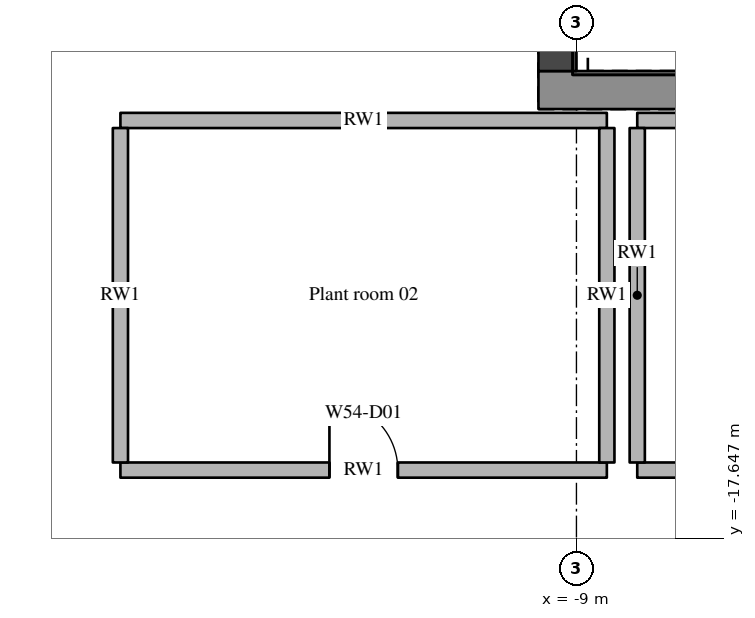
"""IFC4 building model, lengths in metres.
Left out: names, types, materials, properties, quantities, classifications, styles, units other than length and angle.
Written with IfcOpenShell. Run it as: python <this file> out.ifc"""

import sys

from ifc_helpers import new_model, si_unit, direction, frame, frame_2d, origin, place, context, subcontext, project, spatial, rectangle, extrude, element, fill, save


model = new_model("IFC4")
c1 = context("Model", 3, precision=1e-05, world=origin(), true_north=direction((0.0, 1.0)))
c2 = subcontext(c1, "Body", "Model", "MODEL_VIEW")
j1 = project(units=[si_unit("LENGTHUNIT", "METRE"), si_unit("PLANEANGLEUNIT", "RADIAN")], contexts=[c1])
p1 = place(None, origin())
s1 = spatial("IfcSite", under=j1, at=p1, CompositionType="ELEMENT")
p2 = place(p1, origin())
s2 = spatial("IfcBuilding", under=s1, at=p2, CompositionType="ELEMENT")
p3 = place(p2, frame((0.0, 0.0, 210.0)))
s3 = spatial("IfcBuildingStorey", under=s2, at=p3, CompositionType="ELEMENT", Elevation=210.0)
p4 = place(p3, frame((-9.5, -11.75, 0.0), z_axis=(0.0, 0.0, 1.0), x_axis=(1.0, 0.0, 0.0)))
e1 = element("IfcWall", 1, at=p4, inside=s3, PredefinedType="SHEAR", context=c2, shape_type="SweptSolid", body=[
    extrude(rectangle(XDim=19.0, YDim=0.5, at=frame_2d((9.5, 0.0))), origin(), (0.0, 0.0, 1.0), 7.2),
])
p5 = place(p3, frame((-9.25, -11.5, 0.0), z_axis=(0.0, 0.0, 1.0), x_axis=(0.0, 1.0, 0.0)))
e2 = element("IfcWall", 2, at=p5, inside=s3, PredefinedType="SHEAR", context=c2, shape_type="SweptSolid", body=[
    extrude(rectangle(XDim=11.65, YDim=0.5, at=frame_2d((5.825, 0.0))), origin(), (0.0, 0.0, 1.0), 7.2),
])
p6 = place(p3, frame((-15.0, -16.75, 0.0), z_axis=(0.0, 0.0, 1.0), x_axis=(1.0, 0.0, 0.0)))
e3 = element("IfcWall", 3, at=p6, inside=s3, PredefinedType="SOLIDWALL", context=c2, shape_type="SweptSolid", body=[
    extrude(rectangle(XDim=6.4, YDim=0.2, at=frame_2d((3.2, 0.0))), origin(), (0.0, 0.0, 1.0), 5.5),
])
p7 = place(p6, frame((2.75, 0.0, 0.0)))
e4 = element("IfcOpeningElement", 4, at=p7, cuts=e3, PredefinedType="OPENING", context=c2, shape_type="SweptSolid", body=[
    extrude(rectangle(XDim=0.9, YDim=2.1, at=frame_2d((0.45, 1.05))), frame((0.0, 0.11, 0.0), z_axis=(0.0, -1.0, 0.0), x_axis=(1.0, 0.0, 0.0)), (0.0, 0.0, 1.0), 0.22),
])
p8 = place(p3, frame((-8.2, -16.75, 0.0), z_axis=(0.0, 0.0, 1.0), x_axis=(1.0, 0.0, 0.0)))
e5 = element("IfcWall", 5, at=p8, inside=s3, PredefinedType="SOLIDWALL", context=c2, shape_type="SweptSolid", body=[
    extrude(rectangle(XDim=6.4, YDim=0.2, at=frame_2d((3.2, 0.0))), origin(), (0.0, 0.0, 1.0), 5.5),
])
p9 = place(p8, frame((2.75, 0.0, 0.0)))
e6 = element("IfcOpeningElement", 6, at=p9, cuts=e5, PredefinedType="OPENING", context=c2, shape_type="SweptSolid", body=[
    extrude(rectangle(XDim=0.9, YDim=2.1, at=frame_2d((0.45, 1.05))), frame((0.0, 0.11, 0.0), z_axis=(0.0, -1.0, 0.0), x_axis=(1.0, 0.0, 0.0)), (0.0, 0.0, 1.0), 0.22),
])
for number, where, z_axis, x_axis in (
    (7, (-15.0, -12.15, 0.0), (0.0, 0.0, 1.0), (1.0, 0.0, 0.0)),
    (8, (-8.2, -12.15, 0.0), (0.0, 0.0, 1.0), (1.0, 0.0, 0.0)),
):
    element("IfcWall", number, at=place(p3, frame(where, z_axis=z_axis, x_axis=x_axis)), inside=s3, PredefinedType="SOLIDWALL", context=c2, shape_type="SweptSolid", body=[
        extrude(rectangle(XDim=6.4, YDim=0.2, at=frame_2d((3.2, 0.0))), origin(), (0.0, 0.0, 1.0), 5.5),
    ])
for number, where, z_axis, x_axis in (
    (9, (-15.0, -16.65, 0.0), (0.0, 0.0, 1.0), (0.0, 1.0, 0.0)),
    (10, (-8.6, -16.65, 0.0), (0.0, 0.0, 1.0), (0.0, 1.0, 0.0)),
    (11, (-8.2, -16.65, 0.0), (0.0, 0.0, 1.0), (0.0, 1.0, 0.0)),
):
    element("IfcWall", number, at=place(p3, frame(where, z_axis=z_axis, x_axis=x_axis)), inside=s3, PredefinedType="SOLIDWALL", context=c2, shape_type="SweptSolid", body=[
        extrude(rectangle(XDim=4.4, YDim=0.2, at=frame_2d((2.2, 0.0))), origin(), (0.0, 0.0, 1.0), 5.5),
    ])
p10 = place(p7, origin())
e12 = element("IfcDoor", 12, at=p10, inside=s3, OperationType="SINGLE_SWING_LEFT", PredefinedType="DOOR", context=c2, shape_type="SweptSolid", body=[
    extrude(rectangle(XDim=0.9, YDim=2.1, at=frame_2d((0.45, 1.05))), frame((0.0, 0.025, 0.0), z_axis=(0.0, -1.0, 0.0), x_axis=(1.0, 0.0, 0.0)), (0.0, 0.0, 1.0), 0.05),
])
fill(e4, e12)
save(model, sys.argv[1])
